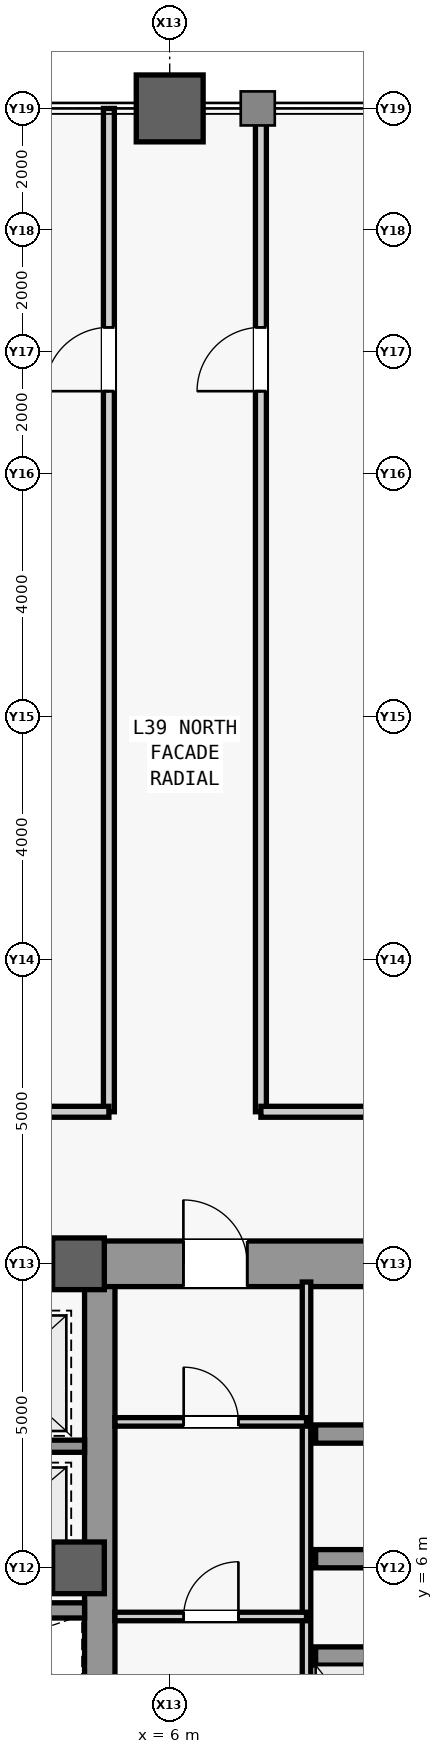
"""IFC4 building model, lengths in metres.
Left out: names, types, materials, properties, quantities, classifications, styles, units other than length and angle.
Written with IfcOpenShell. Run it as: python <this file> out.ifc"""

import sys

from ifc_helpers import new_model, si_unit, direction, frame, frame_2d, origin, origin_2d, place, context, subcontext, project, spatial, rectangle, hollow_rectangle, extrude, source, transform, mapped, element, fill, save


model = new_model("IFC4")
c1 = context("Model", 3, precision=1e-05, world=origin(), true_north=direction((0.0, 1.0)))
c2 = subcontext(c1, "Body", "Model", "MODEL_VIEW")
j1 = project(units=[si_unit("LENGTHUNIT", "METRE"), si_unit("PLANEANGLEUNIT", "RADIAN")], contexts=[c1])
p1 = place(None, origin())
s1 = spatial("IfcSite", under=j1, at=p1, CompositionType="ELEMENT")
p2 = place(p1, origin())
s2 = spatial("IfcBuilding", under=s1, at=p2, CompositionType="ELEMENT")
p3 = place(p2, frame((0.0, 0.0, 171.1)))
s3 = spatial("IfcBuildingStorey", under=s2, at=p3, CompositionType="ELEMENT", Elevation=171.1)
m1 = source(origin(), c2, "Body", "SweptSolid", [
    extrude(rectangle(XDim=21.4, YDim=0.5, at=frame_2d((10.7, 0.0))), origin(), (0.0, 0.0, 1.0), 3.78),
])
p4 = place(p3, frame((4.85, -10.7, 0.0), z_axis=(0.0, 0.0, 1.0), x_axis=(0.0, 1.0, 0.0)))
e1 = element("IfcWall", 1, at=p4, inside=s3, PredefinedType="SHEAR", context=c2, shape_type="MappedRepresentation", body=[
    mapped(m1, transform((0.0, 0.0, 0.0), scale=1.0)),
])
m2 = source(origin(), c2, "Body", "SweptSolid", [
    extrude(rectangle(XDim=5.85, YDim=0.75, at=frame_2d((2.925, 0.0))), origin(), (0.0, 0.0, 1.0), 3.78),
])
p5 = place(p3, frame((4.85, 11.0, 0.0), z_axis=(0.0, 0.0, 1.0), x_axis=(1.0, 0.0, 0.0)))
e2 = element("IfcWall", 2, at=p5, inside=s3, PredefinedType="SHEAR", context=c2, shape_type="MappedRepresentation", body=[
    mapped(m2, transform((0.0, 0.0, 0.0), scale=1.0)),
])
m3 = source(origin(), c2, "Body", "SweptSolid", [
    extrude(rectangle(XDim=1.05, YDim=2.2, at=frame_2d((0.525, 1.1))), frame((0.0, 0.385, 0.0), z_axis=(0.0, -1.0, 0.0), x_axis=(1.0, 0.0, 0.0)), (0.0, 0.0, 1.0), 0.77),
])
p6 = place(p5, frame((1.375, 0.0, 0.0)))
e3 = element("IfcOpeningElement", 3, at=p6, cuts=e2, PredefinedType="OPENING", context=c2, shape_type="MappedRepresentation", body=[
    mapped(m3, transform((0.0, 0.0, 0.0), scale=1.0)),
])
m4 = source(origin(), c2, "Body", "SweptSolid", [
    extrude(rectangle(XDim=9.2, YDim=0.5, at=frame_2d((4.6, 0.0))), origin(), (0.0, 0.0, 1.0), 3.78),
])
p7 = place(p3, frame((-4.6, 11.0, 0.0), z_axis=(0.0, 0.0, 1.0), x_axis=(1.0, 0.0, 0.0)))
e4 = element("IfcWall", 4, at=p7, inside=s3, PredefinedType="SHEAR", context=c2, shape_type="MappedRepresentation", body=[
    mapped(m4, transform((0.0, 0.0, 0.0), scale=1.0)),
])
m5 = source(origin(), c2, "Body", "SweptSolid", [
    extrude(rectangle(XDim=1.8, YDim=2.25, at=frame_2d((0.9, 1.125))), frame((0.0, 0.26, 0.0), z_axis=(0.0, -1.0, 0.0), x_axis=(1.0, 0.0, 0.0)), (0.0, 0.0, 1.0), 0.52),
])
p8 = place(p7, frame((3.7, 0.0, 0.0)))
e5 = element("IfcOpeningElement", 5, at=p8, cuts=e4, PredefinedType="OPENING", context=c2, shape_type="MappedRepresentation", body=[
    mapped(m5, transform((0.0, 0.0, 0.0), scale=1.0)),
])
m6 = source(origin(), c2, "Body", "SweptSolid", [
    extrude(rectangle(XDim=0.85, YDim=0.85, at=origin_2d()), origin(), (0.0, 0.0, 1.0), 4.0),
])
for number, where, z_axis, x_axis in (
    (6, (4.5, 6.0, 0.0), (0.0, 0.0, 1.0), (1.0, 0.0, 0.0)),
    (7, (4.5, 11.0, 0.0), (0.0, 0.0, 1.0), (1.0, 0.0, 0.0)),
):
    element("IfcColumn", number, at=place(p3, frame(where, z_axis=z_axis, x_axis=x_axis)), inside=s3, PredefinedType="COLUMN", context=c2, shape_type="MappedRepresentation", body=[
        mapped(m6, transform((0.0, 0.0, 0.0), scale=1.0)),
    ])
m7 = source(origin(), c2, "Body", "SweptSolid", [
    extrude(hollow_rectangle(XDim=1.1, YDim=1.1, WallThickness=0.06, at=origin_2d()), origin(), (0.0, 0.0, 1.0), 4.0),
])
p9 = place(p3, frame((6.0, 30.0, 0.0), z_axis=(0.0, 0.0, 1.0), x_axis=(1.0, 0.0, 0.0)))
e8 = element("IfcColumn", 8, at=p9, inside=s3, PredefinedType="COLUMN", context=c2, shape_type="MappedRepresentation", body=[
    mapped(m7, transform((0.0, 0.0, 0.0), scale=1.0)),
])
m8 = source(origin(), c2, "Body", "SweptSolid", [
    extrude(rectangle(XDim=2.3, YDim=0.3, at=frame_2d((1.15, 0.0))), origin(), (0.0, 0.0, 1.0), 3.78),
])
for number, where, z_axis, x_axis in (
    (9, (8.4, 4.55, 0.0), (0.0, 0.0, 1.0), (1.0, 0.0, 0.0)),
    (10, (8.4, 6.15, 0.0), (0.0, 0.0, 1.0), (1.0, 0.0, 0.0)),
    (11, (8.4, 8.2, 0.0), (0.0, 0.0, 1.0), (1.0, 0.0, 0.0)),
):
    element("IfcWall", number, at=place(p3, frame(where, z_axis=z_axis, x_axis=x_axis)), inside=s3, PredefinedType="SHEAR", context=c2, shape_type="MappedRepresentation", body=[
        mapped(m8, transform((0.0, 0.0, 0.0), scale=1.0)),
    ])
m9 = source(origin(), c2, "Body", "SweptSolid", [
    extrude(rectangle(XDim=9.4, YDim=0.14, at=frame_2d((4.7, 0.0))), origin(), (0.0, 0.0, 1.0), 3.78),
])
p10 = place(p3, frame((8.25, 1.3, 0.0), z_axis=(0.0, 0.0, 1.0), x_axis=(0.0, 1.0, 0.0)))
e12 = element("IfcWall", 12, at=p10, inside=s3, PredefinedType="PARTITIONING", context=c2, shape_type="MappedRepresentation", body=[
    mapped(m9, transform((0.0, 0.0, 0.0), scale=1.0)),
])
m10 = source(origin(), c2, "Body", "SweptSolid", [
    extrude(rectangle(XDim=3.15, YDim=0.14, at=frame_2d((1.575, 0.0))), origin(), (0.0, 0.0, 1.0), 3.78),
])
p11 = place(p3, frame((5.1, 8.4, 0.0), z_axis=(0.0, 0.0, 1.0), x_axis=(1.0, 0.0, 0.0)))
e13 = element("IfcWall", 13, at=p11, inside=s3, PredefinedType="PARTITIONING", context=c2, shape_type="MappedRepresentation", body=[
    mapped(m10, transform((0.0, 0.0, 0.0), scale=1.0)),
])
m11 = source(origin(), c2, "Body", "SweptSolid", [
    extrude(rectangle(XDim=0.9, YDim=2.15, at=frame_2d((0.45, 1.075))), frame((0.0, 0.08, 0.0), z_axis=(0.0, -1.0, 0.0), x_axis=(1.0, 0.0, 0.0)), (0.0, 0.0, 1.0), 0.16),
])
p12 = place(p11, frame((1.13, 0.0, 0.0)))
e14 = element("IfcOpeningElement", 14, at=p12, cuts=e13, PredefinedType="OPENING", context=c2, shape_type="MappedRepresentation", body=[
    mapped(m11, transform((0.0, 0.0, 0.0), scale=1.0)),
])
p13 = place(p3, frame((5.1, 5.2, 0.0), z_axis=(0.0, 0.0, 1.0), x_axis=(1.0, 0.0, 0.0)))
e15 = element("IfcWall", 15, at=p13, inside=s3, PredefinedType="PARTITIONING", context=c2, shape_type="MappedRepresentation", body=[
    mapped(m10, transform((0.0, 0.0, 0.0), scale=1.0)),
])
p14 = place(p13, frame((1.13, 0.0, 0.0)))
e16 = element("IfcOpeningElement", 16, at=p14, cuts=e15, PredefinedType="OPENING", context=c2, shape_type="MappedRepresentation", body=[
    mapped(m11, transform((0.0, 0.0, 0.0), scale=1.0)),
])
m12 = source(origin(), c2, "Body", "SweptSolid", [
    extrude(rectangle(XDim=2.45, YDim=0.2, at=frame_2d((1.225, 0.0))), origin(), (0.0, 0.0, 1.0), 3.78),
])
p15 = place(p3, frame((2.15, 8.0, 0.0), z_axis=(0.0, 0.0, 1.0), x_axis=(1.0, 0.0, 0.0)))
e17 = element("IfcWall", 17, at=p15, inside=s3, PredefinedType="SHEAR", context=c2, shape_type="MappedRepresentation", body=[
    mapped(m12, transform((0.0, 0.0, 0.0), scale=1.0)),
])
m13 = source(origin(), c2, "Body", "SweptSolid", [
    extrude(rectangle(XDim=9.2, YDim=0.25, at=frame_2d((4.6, 0.0))), origin(), (0.0, 0.0, 1.0), 3.78),
])
p16 = place(p3, frame((-4.6, 5.3, 0.0), z_axis=(0.0, 0.0, 1.0), x_axis=(1.0, 0.0, 0.0)))
e18 = element("IfcWall", 18, at=p16, inside=s3, PredefinedType="SHEAR", context=c2, shape_type="MappedRepresentation", body=[
    mapped(m13, transform((0.0, 0.0, 0.0), scale=1.0)),
])
m14 = source(origin(), c2, "Body", "SweptSolid", [
    extrude(rectangle(XDim=1.05, YDim=2.2, at=frame_2d((0.525, 1.1))), frame((0.0, 0.135, 0.0), z_axis=(0.0, -1.0, 0.0), x_axis=(1.0, 0.0, 0.0)), (0.0, 0.0, 1.0), 0.27),
])
p17 = place(p16, frame((4.075, 0.0, 0.0)))
e19 = element("IfcOpeningElement", 19, at=p17, cuts=e18, PredefinedType="OPENING", context=c2, shape_type="MappedRepresentation", body=[
    mapped(m14, transform((0.0, 0.0, 0.0), scale=1.0)),
])
m15 = source(origin(), c2, "Body", "SweptSolid", [
    extrude(rectangle(XDim=16.5, YDim=0.18, at=frame_2d((8.25, 0.0))), origin(), (0.0, 0.0, 1.0), 3.78),
])
p18 = place(p3, frame((5.0, 13.5, 0.0), z_axis=(0.0, 0.0, 1.0), x_axis=(0.0, 1.0, 0.0)))
e20 = element("IfcWall", 20, at=p18, inside=s3, PredefinedType="PARTITIONING", context=c2, shape_type="MappedRepresentation", body=[
    mapped(m15, transform((0.0, 0.0, 0.0), scale=1.0)),
])
m16 = source(origin(), c2, "Body", "SweptSolid", [
    extrude(rectangle(XDim=1.05, YDim=2.2, at=frame_2d((0.525, 1.1))), frame((0.0, 0.1, 0.0), z_axis=(0.0, -1.0, 0.0), x_axis=(1.0, 0.0, 0.0)), (0.0, 0.0, 1.0), 0.2),
])
p19 = place(p18, frame((11.85, 0.0, 0.0)))
e21 = element("IfcOpeningElement", 21, at=p19, cuts=e20, PredefinedType="OPENING", context=c2, shape_type="MappedRepresentation", body=[
    mapped(m16, transform((0.0, 0.0, 0.0), scale=1.0)),
])
m17 = source(origin(), c2, "Body", "SweptSolid", [
    extrude(rectangle(XDim=20.35, YDim=0.18, at=frame_2d((10.175, 0.0))), origin(), (0.0, 0.0, 1.0), 3.78),
])
p20 = place(p3, frame((-15.35, 13.5, 0.0), z_axis=(0.0, 0.0, 1.0), x_axis=(1.0, 0.0, 0.0)))
e22 = element("IfcWall", 22, at=p20, inside=s3, PredefinedType="PARTITIONING", context=c2, shape_type="MappedRepresentation", body=[
    mapped(m17, transform((0.0, 0.0, 0.0), scale=1.0)),
])
p21 = place(p3, frame((7.5, 13.5, 0.0), z_axis=(0.0, 0.0, 1.0), x_axis=(0.0, 1.0, 0.0)))
e23 = element("IfcWall", 23, at=p21, inside=s3, PredefinedType="PARTITIONING", context=c2, shape_type="MappedRepresentation", body=[
    mapped(m15, transform((0.0, 0.0, 0.0), scale=1.0)),
])
p22 = place(p21, frame((11.85, 0.0, 0.0)))
e24 = element("IfcOpeningElement", 24, at=p22, cuts=e23, PredefinedType="OPENING", context=c2, shape_type="MappedRepresentation", body=[
    mapped(m16, transform((0.0, 0.0, 0.0), scale=1.0)),
])
m18 = source(origin(), c2, "Body", "SweptSolid", [
    extrude(rectangle(XDim=7.85, YDim=0.18, at=frame_2d((3.925, 0.0))), origin(), (0.0, 0.0, 1.0), 3.78),
])
p23 = place(p3, frame((7.5, 13.5, 0.0), z_axis=(0.0, 0.0, 1.0), x_axis=(1.0, 0.0, 0.0)))
e25 = element("IfcWall", 25, at=p23, inside=s3, PredefinedType="PARTITIONING", context=c2, shape_type="MappedRepresentation", body=[
    mapped(m18, transform((0.0, 0.0, 0.0), scale=1.0)),
])
m19 = source(origin(), c2, "Body", "SweptSolid", [
    extrude(rectangle(XDim=1.05, YDim=2.2, at=frame_2d((0.525, 1.1))), frame((0.0, 0.025, 0.0), z_axis=(0.0, -1.0, 0.0), x_axis=(1.0, 0.0, 0.0)), (0.0, 0.0, 1.0), 0.05),
])
p24 = place(p6, origin())
e26 = element("IfcDoor", 26, at=p24, inside=s3, OperationType="SINGLE_SWING_LEFT", PredefinedType="DOOR", context=c2, shape_type="MappedRepresentation", body=[
    mapped(m19, transform((0.0, 0.0, 0.0), scale=1.0)),
])
fill(e3, e26)
m20 = source(origin(), c2, "Body", "SweptSolid", [
    extrude(rectangle(XDim=0.9, YDim=2.15, at=frame_2d((0.45, 1.075))), frame((0.0, 0.025, 0.0), z_axis=(0.0, -1.0, 0.0), x_axis=(1.0, 0.0, 0.0)), (0.0, 0.0, 1.0), 0.05),
])
p25 = place(p12, origin())
e27 = element("IfcDoor", 27, at=p25, inside=s3, OperationType="SINGLE_SWING_LEFT", PredefinedType="DOOR", context=c2, shape_type="MappedRepresentation", body=[
    mapped(m20, transform((0.0, 0.0, 0.0), scale=1.0)),
])
fill(e14, e27)
p26 = place(p14, origin())
e28 = element("IfcDoor", 28, at=p26, inside=s3, OperationType="SINGLE_SWING_RIGHT", PredefinedType="DOOR", context=c2, shape_type="MappedRepresentation", body=[
    mapped(m20, transform((0.0, 0.0, 0.0), scale=1.0)),
])
fill(e16, e28)
p27 = place(p19, origin())
e29 = element("IfcDoor", 29, at=p27, inside=s3, OperationType="SINGLE_SWING_LEFT", PredefinedType="DOOR", context=c2, shape_type="MappedRepresentation", body=[
    mapped(m19, transform((0.0, 0.0, 0.0), scale=1.0)),
])
fill(e21, e29)
p28 = place(p22, origin())
e30 = element("IfcDoor", 30, at=p28, inside=s3, OperationType="SINGLE_SWING_LEFT", PredefinedType="DOOR", context=c2, shape_type="MappedRepresentation", body=[
    mapped(m19, transform((0.0, 0.0, 0.0), scale=1.0)),
])
fill(e24, e30)
save(model, sys.argv[1])
